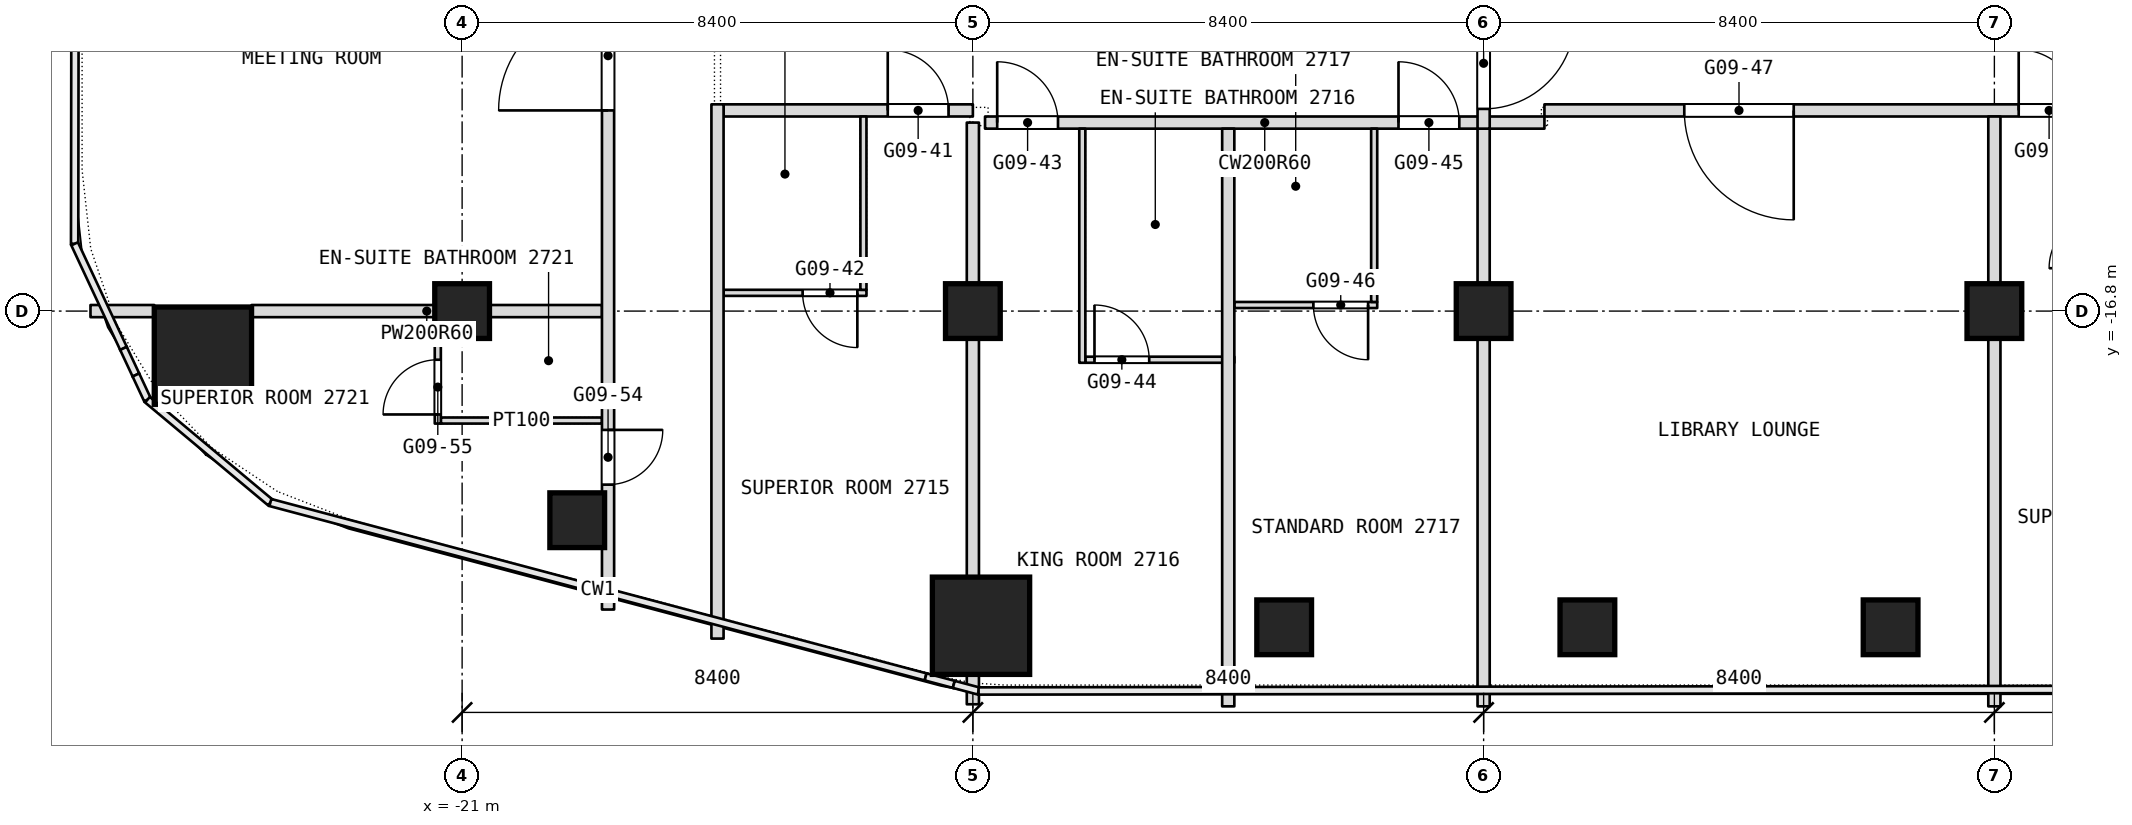
"""IFC4 building model, lengths in metres.
Left out: names, types, materials, properties, quantities, classifications, styles, units other than length and angle.
Written with IfcOpenShell. Run it as: python <this file> out.ifc"""

import sys

from ifc_helpers import new_model, si_unit, direction, frame, frame_2d, origin, origin_2d, place, context, subcontext, project, spatial, rectangle, extrude, element, fill, save


model = new_model("IFC4")
c1 = context("Model", 3, precision=1e-05, world=origin(), true_north=direction((0.0, 1.0)))
c2 = subcontext(c1, "Body", "Model", "MODEL_VIEW")
j1 = project(units=[si_unit("LENGTHUNIT", "METRE"), si_unit("PLANEANGLEUNIT", "RADIAN")], contexts=[c1])
p1 = place(None, origin())
s1 = spatial("IfcSite", under=j1, at=p1, CompositionType="ELEMENT")
p2 = place(p1, origin())
s2 = spatial("IfcBuilding", under=s1, at=p2, CompositionType="ELEMENT")
p3 = place(p2, frame((0.0, 0.0, 122.9)))
s3 = spatial("IfcBuildingStorey", under=s2, at=p3, CompositionType="ELEMENT", Elevation=122.9)
for number, where, z_axis, x_axis in (
    (1, (-25.263, -17.533, 0.0), (0.0, 0.0, 1.0), (1.0, 0.0, 0.0)),
    (2, (-12.466, -21.975, 0.0), (0.0, 0.0, 1.0), (1.0, 0.0, 0.0)),
):
    element("IfcColumn", number, at=place(p3, frame(where, z_axis=z_axis, x_axis=x_axis)), inside=s3, PredefinedType="COLUMN", context=c2, shape_type="SweptSolid", body=[
        extrude(rectangle(XDim=1.6, YDim=1.6, at=origin_2d()), origin(), (0.0, 0.0, 1.0), 3.6),
    ])
for number, where, z_axis, x_axis in (
    (3, (-21.0, -16.8, 0.0), (0.0, 0.0, 1.0), (1.0, 0.0, 0.0)),
    (4, (-12.6, -16.8, 0.0), (0.0, 0.0, 1.0), (1.0, 0.0, 0.0)),
    (5, (-4.2, -16.8, 0.0), (0.0, 0.0, 1.0), (1.0, 0.0, 0.0)),
    (6, (4.2, -16.8, 0.0), (0.0, 0.0, 1.0), (1.0, 0.0, 0.0)),
    (7, (2.493, -22.0, 0.0), (0.0, 0.0, 1.0), (1.0, 0.0, 0.0)),
    (8, (-2.493, -22.0, 0.0), (0.0, 0.0, 1.0), (1.0, 0.0, 0.0)),
    (9, (-7.48, -22.0, 0.0), (0.0, 0.0, 1.0), (1.0, 0.0, 0.0)),
    (10, (-19.107, -20.239, 0.0), (0.0, 0.0, 1.0), (1.0, 0.0, 0.0)),
):
    element("IfcColumn", number, at=place(p3, frame(where, z_axis=z_axis, x_axis=x_axis)), inside=s3, PredefinedType="COLUMN", context=c2, shape_type="SweptSolid", body=[
        extrude(rectangle(XDim=0.9, YDim=0.9, at=origin_2d()), origin(), (0.0, 0.0, 1.0), 3.6),
    ])
p4 = place(p3, frame((-21.35, -18.6, 0.0), z_axis=(0.0, 0.0, 1.0), x_axis=(1.0, 0.0, 0.0)))
e11 = element("IfcWall", 11, at=p4, inside=s3, PredefinedType="PARTITIONING", context=c2, shape_type="SweptSolid", body=[
    extrude(rectangle(XDim=2.65, YDim=0.1, at=frame_2d((1.325, 0.0))), origin(), (0.0, 0.0, 1.0), 3.34),
])
p5 = place(p3, frame((-10.75, -17.6, 0.0), z_axis=(0.0, 0.0, 1.0), x_axis=(1.0, 0.0, 0.0)))
e12 = element("IfcWall", 12, at=p5, inside=s3, PredefinedType="PARTITIONING", context=c2, shape_type="SweptSolid", body=[
    extrude(rectangle(XDim=2.45, YDim=0.1, at=frame_2d((1.225, 0.0))), origin(), (0.0, 0.0, 1.0), 3.34),
])
p6 = place(p5, frame((0.15, 0.0, 0.0)))
e13 = element("IfcOpeningElement", 13, at=p6, cuts=e12, PredefinedType="OPENING", context=c2, shape_type="SweptSolid", body=[
    extrude(rectangle(XDim=0.9, YDim=2.1, at=frame_2d((0.45, 1.05))), frame((0.0, 0.05, 0.0), z_axis=(0.0, -1.0, 0.0), x_axis=(1.0, 0.0, 0.0)), (0.0, 0.0, 1.0), 0.1),
])
p7 = place(p3, frame((-27.112, -16.8, 0.0), z_axis=(0.0, 0.0, 1.0), x_axis=(1.0, 0.0, 0.0)))
e14 = element("IfcWall", 14, at=p7, inside=s3, PredefinedType="PARTITIONING", context=c2, shape_type="SweptSolid", body=[
    extrude(rectangle(XDim=1.049, YDim=0.2, at=frame_2d((0.524, 0.0))), origin(), (0.0, 0.0, 1.0), 3.34),
])
p8 = place(p3, frame((-24.463, -16.8, 0.0), z_axis=(0.0, 0.0, 1.0), x_axis=(1.0, 0.0, 0.0)))
e15 = element("IfcWall", 15, at=p8, inside=s3, PredefinedType="PARTITIONING", context=c2, shape_type="SweptSolid", body=[
    extrude(rectangle(XDim=5.763, YDim=0.2, at=frame_2d((2.881, 0.0))), origin(), (0.0, 0.0, 1.0), 2.89),
])
p9 = place(p3, frame((-8.3, -16.7, 0.0), z_axis=(0.0, 0.0, 1.0), x_axis=(1.0, 0.0, 0.0)))
e16 = element("IfcWall", 16, at=p9, inside=s3, PredefinedType="PARTITIONING", context=c2, shape_type="SweptSolid", body=[
    extrude(rectangle(XDim=2.35, YDim=0.1, at=frame_2d((1.175, 0.0))), origin(), (0.0, 0.0, 1.0), 2.89),
])
p10 = place(p9, frame((1.3, 0.0, 0.0)))
e17 = element("IfcOpeningElement", 17, at=p10, cuts=e16, PredefinedType="OPENING", context=c2, shape_type="SweptSolid", body=[
    extrude(rectangle(XDim=0.9, YDim=2.1, at=frame_2d((0.45, 1.05))), frame((0.0, 0.05, 0.0), z_axis=(0.0, -1.0, 0.0), x_axis=(1.0, 0.0, 0.0)), (0.0, 0.0, 1.0), 0.1),
])
p11 = place(p3, frame((-16.7, -16.5, 0.0), z_axis=(0.0, 0.0, 1.0), x_axis=(1.0, 0.0, 0.0)))
e18 = element("IfcWall", 18, at=p11, inside=s3, PredefinedType="PARTITIONING", context=c2, shape_type="SweptSolid", body=[
    extrude(rectangle(XDim=2.35, YDim=0.1, at=frame_2d((1.175, 0.0))), origin(), (0.0, 0.0, 1.0), 3.34),
])
p12 = place(p11, frame((1.3, 0.0, 0.0)))
e19 = element("IfcOpeningElement", 19, at=p12, cuts=e18, PredefinedType="OPENING", context=c2, shape_type="SweptSolid", body=[
    extrude(rectangle(XDim=0.9, YDim=2.1, at=frame_2d((0.45, 1.05))), frame((0.0, 0.05, 0.0), z_axis=(0.0, -1.0, 0.0), x_axis=(1.0, 0.0, 0.0)), (0.0, 0.0, 1.0), 0.1),
])
p13 = place(p3, frame((-12.4, -13.7, 0.0), z_axis=(0.0, 0.0, 1.0), x_axis=(1.0, 0.0, 0.0)))
e20 = element("IfcWall", 20, at=p13, inside=s3, PredefinedType="PARTITIONING", context=c2, shape_type="SweptSolid", body=[
    extrude(rectangle(XDim=9.2, YDim=0.2, at=frame_2d((4.6, 0.0))), origin(), (0.0, 0.0, 1.0), 3.34),
])
p14 = place(p13, frame((0.2, 0.0, 0.0)))
e21 = element("IfcOpeningElement", 21, at=p14, cuts=e20, PredefinedType="OPENING", context=c2, shape_type="SweptSolid", body=[
    extrude(rectangle(XDim=1.0, YDim=2.1, at=frame_2d((0.5, 1.05))), frame((0.0, 0.1, 0.0), z_axis=(0.0, -1.0, 0.0), x_axis=(1.0, 0.0, 0.0)), (0.0, 0.0, 1.0), 0.2),
])
p15 = place(p13, frame((6.8, 0.0, 0.0)))
e22 = element("IfcOpeningElement", 22, at=p15, cuts=e20, PredefinedType="OPENING", context=c2, shape_type="SweptSolid", body=[
    extrude(rectangle(XDim=1.0, YDim=2.1, at=frame_2d((0.5, 1.05))), frame((0.0, 0.1, 0.0), z_axis=(0.0, -1.0, 0.0), x_axis=(1.0, 0.0, 0.0)), (0.0, 0.0, 1.0), 0.2),
])
p16 = place(p3, frame((-16.7, -13.5, 0.0), z_axis=(0.0, 0.0, 1.0), x_axis=(1.0, 0.0, 0.0)))
e23 = element("IfcWall", 23, at=p16, inside=s3, PredefinedType="PARTITIONING", context=c2, shape_type="SweptSolid", body=[
    extrude(rectangle(XDim=4.1, YDim=0.2, at=frame_2d((2.05, 0.0))), origin(), (0.0, 0.0, 1.0), 3.34),
])
p17 = place(p16, frame((2.7, 0.0, 0.0)))
e24 = element("IfcOpeningElement", 24, at=p17, cuts=e23, PredefinedType="OPENING", context=c2, shape_type="SweptSolid", body=[
    extrude(rectangle(XDim=1.0, YDim=2.1, at=frame_2d((0.5, 1.05))), frame((0.0, 0.1, 0.0), z_axis=(0.0, -1.0, 0.0), x_axis=(1.0, 0.0, 0.0)), (0.0, 0.0, 1.0), 0.2),
])
p18 = place(p3, frame((-3.2, -13.5, 0.0), z_axis=(0.0, 0.0, 1.0), x_axis=(1.0, 0.0, 0.0)))
e25 = element("IfcWall", 25, at=p18, inside=s3, PredefinedType="PARTITIONING", context=c2, shape_type="SweptSolid", body=[
    extrude(rectangle(XDim=19.9, YDim=0.2, at=frame_2d((9.95, 0.0))), origin(), (0.0, 0.0, 1.0), 3.34),
])
p19 = place(p18, frame((2.3, 0.0, 0.0)))
e26 = element("IfcOpeningElement", 26, at=p19, cuts=e25, PredefinedType="OPENING", context=c2, shape_type="SweptSolid", body=[
    extrude(rectangle(XDim=1.8, YDim=2.1, at=frame_2d((0.9, 1.05))), frame((0.0, 0.1, 0.0), z_axis=(0.0, -1.0, 0.0), x_axis=(1.0, 0.0, 0.0)), (0.0, 0.0, 1.0), 0.2),
])
p20 = place(p18, frame((7.8, 0.0, 0.0)))
e27 = element("IfcOpeningElement", 27, at=p20, cuts=e25, PredefinedType="OPENING", context=c2, shape_type="SweptSolid", body=[
    extrude(rectangle(XDim=1.0, YDim=2.1, at=frame_2d((0.5, 1.05))), frame((0.0, 0.1, 0.0), z_axis=(0.0, -1.0, 0.0), x_axis=(1.0, 0.0, 0.0)), (0.0, 0.0, 1.0), 0.2),
])
p21 = place(p18, frame((14.4, 0.0, 0.0)))
e28 = element("IfcOpeningElement", 28, at=p21, cuts=e25, PredefinedType="OPENING", context=c2, shape_type="SweptSolid", body=[
    extrude(rectangle(XDim=1.0, YDim=2.1, at=frame_2d((0.5, 1.05))), frame((0.0, 0.1, 0.0), z_axis=(0.0, -1.0, 0.0), x_axis=(1.0, 0.0, 0.0)), (0.0, 0.0, 1.0), 0.2),
])
p22 = place(p18, frame((18.6, 0.0, 0.0)))
e29 = element("IfcOpeningElement", 29, at=p22, cuts=e25, PredefinedType="OPENING", context=c2, shape_type="SweptSolid", body=[
    extrude(rectangle(XDim=1.0, YDim=2.1, at=frame_2d((0.5, 1.05))), frame((0.0, 0.1, 0.0), z_axis=(0.0, -1.0, 0.0), x_axis=(1.0, 0.0, 0.0)), (0.0, 0.0, 1.0), 0.2),
])
p23 = place(p3, frame((4.2, -23.3, 0.0), z_axis=(0.0, 0.0, 1.0), x_axis=(0.0, 1.0, 0.0)))
e30 = element("IfcWall", 30, at=p23, inside=s3, PredefinedType="PARTITIONING", context=c2, shape_type="SweptSolid", body=[
    extrude(rectangle(XDim=9.7, YDim=0.2, at=frame_2d((4.85, 0.0))), origin(), (0.0, 0.0, 1.0), 3.34),
])
p24 = place(p3, frame((-4.2, -23.3, 0.0), z_axis=(0.0, 0.0, 1.0), x_axis=(0.0, 1.0, 0.0)))
e31 = element("IfcWall", 31, at=p24, inside=s3, PredefinedType="PARTITIONING", context=c2, shape_type="SweptSolid", body=[
    extrude(rectangle(XDim=9.5, YDim=0.2, at=frame_2d((4.75, 0.0))), origin(), (0.0, 0.0, 1.0), 3.34),
])
p25 = place(p3, frame((-4.2, -13.8, 0.0), z_axis=(0.0, 0.0, 1.0), x_axis=(0.0, 1.0, 0.0)))
e32 = element("IfcWall", 32, at=p25, inside=s3, PredefinedType="PARTITIONING", context=c2, shape_type="SweptSolid", body=[
    extrude(rectangle(XDim=13.8, YDim=0.2, at=frame_2d((6.9, 0.0))), origin(), (0.0, 0.0, 1.0), 3.34),
])
p26 = place(p25, frame((12.15, 0.0, 0.0)))
e33 = element("IfcOpeningElement", 33, at=p26, cuts=e32, PredefinedType="OPENING", context=c2, shape_type="SweptSolid", body=[
    extrude(rectangle(XDim=1.5, YDim=2.1, at=frame_2d((0.75, 1.05))), frame((0.0, 0.1, 0.0), z_axis=(0.0, -1.0, 0.0), x_axis=(1.0, 0.0, 0.0)), (0.0, 0.0, 1.0), 0.2),
])
p27 = place(p25, frame((0.325, 0.0, 0.0)))
e34 = element("IfcOpeningElement", 34, at=p27, cuts=e32, PredefinedType="OPENING", context=c2, shape_type="SweptSolid", body=[
    extrude(rectangle(XDim=1.5, YDim=2.1, at=frame_2d((0.75, 1.05))), frame((0.0, 0.1, 0.0), z_axis=(0.0, -1.0, 0.0), x_axis=(1.0, 0.0, 0.0)), (0.0, 0.0, 1.0), 0.2),
])
p28 = place(p3, frame((-6.0, -16.65, 0.0), z_axis=(0.0, 0.0, 1.0), x_axis=(0.0, 1.0, 0.0)))
e35 = element("IfcWall", 35, at=p28, inside=s3, PredefinedType="PARTITIONING", context=c2, shape_type="SweptSolid", body=[
    extrude(rectangle(XDim=2.85, YDim=0.1, at=frame_2d((1.425, 0.0))), origin(), (0.0, 0.0, 1.0), 3.34),
])
p29 = place(p3, frame((-8.4, -23.3, 0.0), z_axis=(0.0, 0.0, 1.0), x_axis=(0.0, 1.0, 0.0)))
e36 = element("IfcWall", 36, at=p29, inside=s3, PredefinedType="PARTITIONING", context=c2, shape_type="SweptSolid", body=[
    extrude(rectangle(XDim=9.5, YDim=0.2, at=frame_2d((4.75, 0.0))), origin(), (0.0, 0.0, 1.0), 3.34),
])
p30 = place(p3, frame((-10.8, -17.65, 0.0), z_axis=(0.0, 0.0, 1.0), x_axis=(0.0, 1.0, 0.0)))
e37 = element("IfcWall", 37, at=p30, inside=s3, PredefinedType="PARTITIONING", context=c2, shape_type="SweptSolid", body=[
    extrude(rectangle(XDim=3.85, YDim=0.1, at=frame_2d((1.925, 0.0))), origin(), (0.0, 0.0, 1.0), 3.34),
])
p31 = place(p3, frame((-12.6, -23.266, 0.0), z_axis=(0.0, 0.0, 1.0), x_axis=(0.0, 1.0, 0.0)))
e38 = element("IfcWall", 38, at=p31, inside=s3, PredefinedType="PARTITIONING", context=c2, shape_type="SweptSolid", body=[
    extrude(rectangle(XDim=0.491, YDim=0.2, at=frame_2d((0.246, 0.0))), origin(), (0.0, 0.0, 1.0), 3.34),
])
p32 = place(p3, frame((-12.6, -21.175, 0.0), z_axis=(0.0, 0.0, 1.0), x_axis=(0.0, 1.0, 0.0)))
e39 = element("IfcWall", 39, at=p32, inside=s3, PredefinedType="PARTITIONING", context=c2, shape_type="SweptSolid", body=[
    extrude(rectangle(XDim=7.475, YDim=0.2, at=frame_2d((3.738, 0.0))), origin(), (0.0, 0.0, 1.0), 3.34),
])
p33 = place(p3, frame((-14.4, -16.45, 0.0), z_axis=(0.0, 0.0, 1.0), x_axis=(0.0, 1.0, 0.0)))
e40 = element("IfcWall", 40, at=p33, inside=s3, PredefinedType="PARTITIONING", context=c2, shape_type="SweptSolid", body=[
    extrude(rectangle(XDim=2.85, YDim=0.1, at=frame_2d((1.425, 0.0))), origin(), (0.0, 0.0, 1.0), 3.34),
])
p34 = place(p3, frame((-16.8, -22.186, 0.0), z_axis=(0.0, 0.0, 1.0), x_axis=(0.0, 1.0, 0.0)))
e41 = element("IfcWall", 41, at=p34, inside=s3, PredefinedType="PARTITIONING", context=c2, shape_type="SweptSolid", body=[
    extrude(rectangle(XDim=8.786, YDim=0.2, at=frame_2d((4.393, 0.0))), origin(), (0.0, 0.0, 1.0), 3.34),
])
p35 = place(p3, frame((-18.6, -21.708, 0.0), z_axis=(0.0, 0.0, 1.0), x_axis=(0.0, 1.0, 0.0)))
e42 = element("IfcWall", 42, at=p35, inside=s3, PredefinedType="PARTITIONING", context=c2, shape_type="SweptSolid", body=[
    extrude(rectangle(XDim=28.608, YDim=0.2, at=frame_2d((14.304, 0.0))), origin(), (0.0, 0.0, 1.0), 3.34),
])
p36 = place(p35, frame((2.054, 0.0, 0.0)))
e43 = element("IfcOpeningElement", 43, at=p36, cuts=e42, PredefinedType="OPENING", context=c2, shape_type="SweptSolid", body=[
    extrude(rectangle(XDim=0.9, YDim=2.1, at=frame_2d((0.45, 1.05))), frame((0.0, 0.1, 0.0), z_axis=(0.0, -1.0, 0.0), x_axis=(1.0, 0.0, 0.0)), (0.0, 0.0, 1.0), 0.2),
])
p37 = place(p35, frame((8.208, 0.0, 0.0)))
e44 = element("IfcOpeningElement", 44, at=p37, cuts=e42, PredefinedType="OPENING", context=c2, shape_type="SweptSolid", body=[
    extrude(rectangle(XDim=1.8, YDim=2.1, at=frame_2d((0.9, 1.05))), frame((0.0, 0.1, 0.0), z_axis=(0.0, -1.0, 0.0), x_axis=(1.0, 0.0, 0.0)), (0.0, 0.0, 1.0), 0.2),
])
p38 = place(p35, frame((13.708, 0.0, 0.0)))
e45 = element("IfcOpeningElement", 45, at=p38, cuts=e42, PredefinedType="OPENING", context=c2, shape_type="SweptSolid", body=[
    extrude(rectangle(XDim=1.0, YDim=2.1, at=frame_2d((0.5, 1.05))), frame((0.0, 0.1, 0.0), z_axis=(0.0, -1.0, 0.0), x_axis=(1.0, 0.0, 0.0)), (0.0, 0.0, 1.0), 0.2),
])
p39 = place(p35, frame((20.308, 0.0, 0.0)))
e46 = element("IfcOpeningElement", 46, at=p39, cuts=e42, PredefinedType="OPENING", context=c2, shape_type="SweptSolid", body=[
    extrude(rectangle(XDim=1.0, YDim=2.1, at=frame_2d((0.5, 1.05))), frame((0.0, 0.1, 0.0), z_axis=(0.0, -1.0, 0.0), x_axis=(1.0, 0.0, 0.0)), (0.0, 0.0, 1.0), 0.2),
])
p40 = place(p35, frame((24.508, 0.0, 0.0)))
e47 = element("IfcOpeningElement", 47, at=p40, cuts=e42, PredefinedType="OPENING", context=c2, shape_type="SweptSolid", body=[
    extrude(rectangle(XDim=1.0, YDim=2.1, at=frame_2d((0.5, 1.05))), frame((0.0, 0.1, 0.0), z_axis=(0.0, -1.0, 0.0), x_axis=(1.0, 0.0, 0.0)), (0.0, 0.0, 1.0), 0.2),
])
p41 = place(p3, frame((-21.4, -18.65, 0.0), z_axis=(0.0, 0.0, 1.0), x_axis=(0.0, 1.0, 0.0)))
e48 = element("IfcWall", 48, at=p41, inside=s3, PredefinedType="PARTITIONING", context=c2, shape_type="SweptSolid", body=[
    extrude(rectangle(XDim=1.95, YDim=0.1, at=frame_2d((0.975, 0.0))), origin(), (0.0, 0.0, 1.0), 3.34),
])
p42 = place(p41, frame((0.15, 0.0, 0.0)))
e49 = element("IfcOpeningElement", 49, at=p42, cuts=e48, PredefinedType="OPENING", context=c2, shape_type="SweptSolid", body=[
    extrude(rectangle(XDim=0.9, YDim=2.1, at=frame_2d((0.45, 1.05))), frame((0.0, 0.05, 0.0), z_axis=(0.0, -1.0, 0.0), x_axis=(1.0, 0.0, 0.0)), (0.0, 0.0, 1.0), 0.1),
])
p43 = place(p6, origin())
e50 = element("IfcDoor", 50, at=p43, inside=s3, OperationType="SINGLE_SWING_LEFT", PredefinedType="DOOR", context=c2, shape_type="SweptSolid", body=[
    extrude(rectangle(XDim=0.9, YDim=2.1, at=frame_2d((0.45, 1.05))), frame((0.0, 0.025, 0.0), z_axis=(0.0, -1.0, 0.0), x_axis=(1.0, 0.0, 0.0)), (0.0, 0.0, 1.0), 0.05),
])
fill(e13, e50)
p44 = place(p10, origin())
e51 = element("IfcDoor", 51, at=p44, inside=s3, OperationType="SINGLE_SWING_RIGHT", PredefinedType="DOOR", context=c2, shape_type="SweptSolid", body=[
    extrude(rectangle(XDim=0.9, YDim=2.1, at=frame_2d((0.45, 1.05))), frame((0.0, 0.025, 0.0), z_axis=(0.0, -1.0, 0.0), x_axis=(1.0, 0.0, 0.0)), (0.0, 0.0, 1.0), 0.05),
])
fill(e17, e51)
p45 = place(p12, origin())
e52 = element("IfcDoor", 52, at=p45, inside=s3, OperationType="SINGLE_SWING_RIGHT", PredefinedType="DOOR", context=c2, shape_type="SweptSolid", body=[
    extrude(rectangle(XDim=0.9, YDim=2.1, at=frame_2d((0.45, 1.05))), frame((0.0, 0.025, 0.0), z_axis=(0.0, -1.0, 0.0), x_axis=(1.0, 0.0, 0.0)), (0.0, 0.0, 1.0), 0.05),
])
fill(e19, e52)
p46 = place(p14, origin())
e53 = element("IfcDoor", 53, at=p46, inside=s3, OperationType="SINGLE_SWING_RIGHT", PredefinedType="DOOR", context=c2, shape_type="SweptSolid", body=[
    extrude(rectangle(XDim=1.0, YDim=2.1, at=frame_2d((0.5, 1.05))), frame((0.0, 0.025, 0.0), z_axis=(0.0, -1.0, 0.0), x_axis=(1.0, 0.0, 0.0)), (0.0, 0.0, 1.0), 0.05),
])
fill(e21, e53)
p47 = place(p15, origin())
e54 = element("IfcDoor", 54, at=p47, inside=s3, OperationType="SINGLE_SWING_LEFT", PredefinedType="DOOR", context=c2, shape_type="SweptSolid", body=[
    extrude(rectangle(XDim=1.0, YDim=2.1, at=frame_2d((0.5, 1.05))), frame((0.0, 0.025, 0.0), z_axis=(0.0, -1.0, 0.0), x_axis=(1.0, 0.0, 0.0)), (0.0, 0.0, 1.0), 0.05),
])
fill(e22, e54)
p48 = place(p17, origin())
e55 = element("IfcDoor", 55, at=p48, inside=s3, OperationType="SINGLE_SWING_LEFT", PredefinedType="DOOR", context=c2, shape_type="SweptSolid", body=[
    extrude(rectangle(XDim=1.0, YDim=2.1, at=frame_2d((0.5, 1.05))), frame((0.0, 0.025, 0.0), z_axis=(0.0, -1.0, 0.0), x_axis=(1.0, 0.0, 0.0)), (0.0, 0.0, 1.0), 0.05),
])
fill(e24, e55)
p49 = place(p19, origin())
e56 = element("IfcDoor", 56, at=p49, inside=s3, OperationType="DOUBLE_DOOR_SINGLE_SWING", PredefinedType="DOOR", context=c2, shape_type="SweptSolid", body=[
    extrude(rectangle(XDim=1.8, YDim=2.1, at=frame_2d((0.9, 1.05))), frame((0.0, 0.025, 0.0), z_axis=(0.0, -1.0, 0.0), x_axis=(1.0, 0.0, 0.0)), (0.0, 0.0, 1.0), 0.05),
])
fill(e26, e56)
p50 = place(p20, origin())
e57 = element("IfcDoor", 57, at=p50, inside=s3, OperationType="SINGLE_SWING_RIGHT", PredefinedType="DOOR", context=c2, shape_type="SweptSolid", body=[
    extrude(rectangle(XDim=1.0, YDim=2.1, at=frame_2d((0.5, 1.05))), frame((0.0, 0.025, 0.0), z_axis=(0.0, -1.0, 0.0), x_axis=(1.0, 0.0, 0.0)), (0.0, 0.0, 1.0), 0.05),
])
fill(e27, e57)
p51 = place(p36, origin())
e58 = element("IfcDoor", 58, at=p51, inside=s3, OperationType="SINGLE_SWING_LEFT", PredefinedType="DOOR", context=c2, shape_type="SweptSolid", body=[
    extrude(rectangle(XDim=0.9, YDim=2.1, at=frame_2d((0.45, 1.05))), frame((0.0, 0.025, 0.0), z_axis=(0.0, -1.0, 0.0), x_axis=(1.0, 0.0, 0.0)), (0.0, 0.0, 1.0), 0.05),
])
fill(e43, e58)
p52 = place(p37, origin())
e59 = element("IfcDoor", 59, at=p52, inside=s3, OperationType="DOUBLE_DOOR_SINGLE_SWING", PredefinedType="DOOR", context=c2, shape_type="SweptSolid", body=[
    extrude(rectangle(XDim=1.8, YDim=2.1, at=frame_2d((0.9, 1.05))), frame((0.0, 0.025, 0.0), z_axis=(0.0, -1.0, 0.0), x_axis=(1.0, 0.0, 0.0)), (0.0, 0.0, 1.0), 0.05),
])
fill(e44, e59)
p53 = place(p42, origin())
e60 = element("IfcDoor", 60, at=p53, inside=s3, OperationType="SINGLE_SWING_RIGHT", PredefinedType="DOOR", context=c2, shape_type="SweptSolid", body=[
    extrude(rectangle(XDim=0.9, YDim=2.1, at=frame_2d((0.45, 1.05))), frame((0.0, 0.025, 0.0), z_axis=(0.0, -1.0, 0.0), x_axis=(1.0, 0.0, 0.0)), (0.0, 0.0, 1.0), 0.05),
])
fill(e49, e60)
p54 = place(p27, origin())
e61 = element("IfcDoor", 61, at=p54, inside=s3, OperationType="DOUBLE_DOOR_DOUBLE_SWING", PredefinedType="DOOR", context=c2, shape_type="SweptSolid", body=[
    extrude(rectangle(XDim=1.5, YDim=2.1, at=frame_2d((0.75, 1.05))), frame((0.0, 0.025, 0.0), z_axis=(0.0, -1.0, 0.0), x_axis=(1.0, 0.0, 0.0)), (0.0, 0.0, 1.0), 0.05),
])
fill(e34, e61)
save(model, sys.argv[1])
